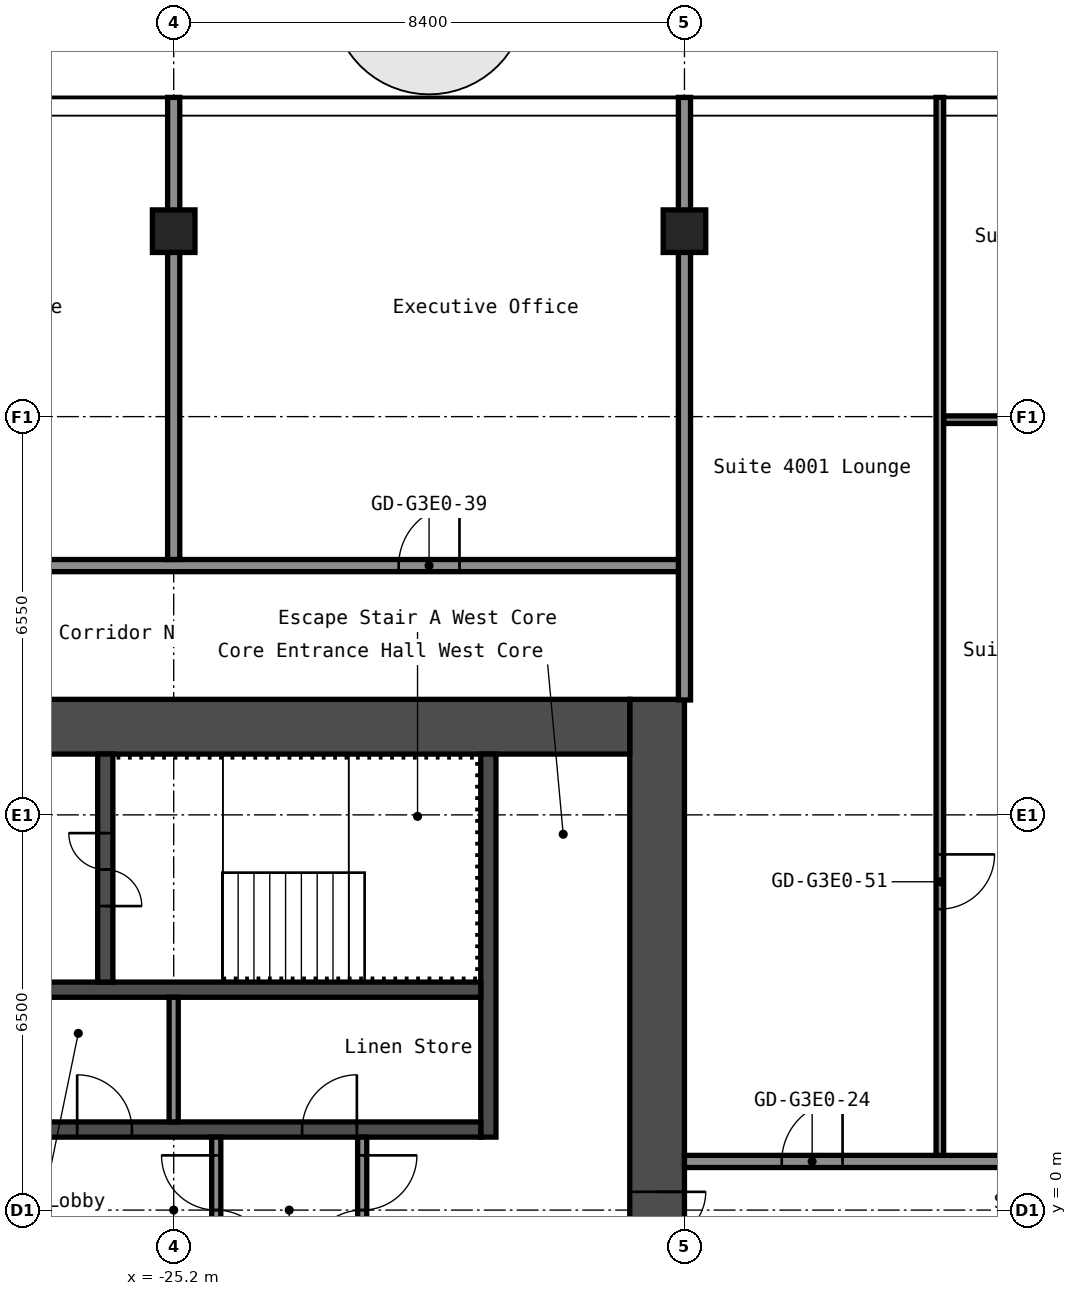
"""IFC4 building model, lengths in metres.
Left out: names, types, materials, properties, quantities, classifications, styles, units other than length and angle.
Written with IfcOpenShell. Run it as: python <this file> out.ifc"""

import sys

from ifc_helpers import new_model, si_unit, direction, frame, frame_2d, origin, origin_2d, place, context, subcontext, project, spatial, rectangle, hollow_rectangle, extrude, element, fill, save


model = new_model("IFC4")
c1 = context("Model", 3, precision=1e-05, world=origin(), true_north=direction((0.0, 1.0)))
c2 = subcontext(c1, "Body", "Model", "MODEL_VIEW")
j1 = project(units=[si_unit("LENGTHUNIT", "METRE"), si_unit("PLANEANGLEUNIT", "RADIAN")], contexts=[c1])
p1 = place(None, origin())
s1 = spatial("IfcSite", under=j1, at=p1, CompositionType="ELEMENT")
p2 = place(p1, origin())
s2 = spatial("IfcBuilding", under=s1, at=p2, CompositionType="ELEMENT")
p3 = place(p2, frame((0.0, 0.0, 143.8)))
s3 = spatial("IfcBuildingStorey", under=s2, at=p3, CompositionType="ELEMENT", Elevation=143.8)
for number, where, z_axis, x_axis in (
    (1, (-25.2, 16.1, 0.0), (0.0, 0.0, 1.0), (1.0, 0.0, 0.0)),
    (2, (-16.8, 16.1, 0.0), (0.0, 0.0, 1.0), (1.0, 0.0, 0.0)),
):
    element("IfcColumn", number, at=place(p3, frame(where, z_axis=z_axis, x_axis=x_axis)), inside=s3, PredefinedType="COLUMN", context=c2, shape_type="SweptSolid", body=[
        extrude(hollow_rectangle(XDim=0.7, YDim=0.7, WallThickness=0.028, at=origin_2d()), origin(), (0.0, 0.0, 1.0), 2.75),
    ])
p4 = place(p3, frame((-17.25, -8.4, 0.0), z_axis=(0.0, 0.0, 1.0), x_axis=(0.0, 1.0, 0.0)))
e3 = element("IfcWall", 3, at=p4, inside=s3, PredefinedType="SHEAR", context=c2, shape_type="SweptSolid", body=[
    extrude(rectangle(XDim=16.8, YDim=0.9, at=frame_2d((8.4, 0.0))), origin(), (0.0, 0.0, 1.0), 2.75),
])
p5 = place(p4, frame((7.1, 0.0, 0.0)))
e4 = element("IfcOpeningElement", 4, at=p5, cuts=e3, PredefinedType="OPENING", context=c2, shape_type="SweptSolid", body=[
    extrude(rectangle(XDim=1.6, YDim=2.1, at=frame_2d((0.8, 1.05))), frame((0.0, 0.46, 0.0), z_axis=(0.0, -1.0, 0.0), x_axis=(1.0, 0.0, 0.0)), (0.0, 0.0, 1.0), 0.92),
])
p6 = place(p3, frame((-32.7, 7.95, 0.0), z_axis=(0.0, 0.0, 1.0), x_axis=(1.0, 0.0, 0.0)))
e5 = element("IfcWall", 5, at=p6, inside=s3, PredefinedType="SHEAR", context=c2, shape_type="SweptSolid", body=[
    extrude(rectangle(XDim=15.0, YDim=0.9, at=frame_2d((7.5, 0.0))), origin(), (0.0, 0.0, 1.0), 2.75),
])
p7 = place(p6, frame((3.4, 0.0, 0.0)))
e6 = element("IfcOpeningElement", 6, at=p7, cuts=e5, PredefinedType="OPENING", context=c2, shape_type="SweptSolid", body=[
    extrude(rectangle(XDim=1.2, YDim=2.1, at=frame_2d((0.6, 1.05))), frame((0.0, 0.46, 0.0), z_axis=(0.0, -1.0, 0.0), x_axis=(1.0, 0.0, 0.0)), (0.0, 0.0, 1.0), 0.92),
])
p8 = place(p6, frame((0.75, 0.0, 0.0)))
e7 = element("IfcOpeningElement", 7, at=p8, cuts=e5, PredefinedType="OPENING", context=c2, shape_type="SweptSolid", body=[
    extrude(rectangle(XDim=0.9, YDim=2.1, at=frame_2d((0.45, 1.05))), frame((0.0, 0.46, 0.0), z_axis=(0.0, -1.0, 0.0), x_axis=(1.0, 0.0, 0.0)), (0.0, 0.0, 1.0), 0.92),
])
p9 = place(p3, frame((-20.025, 1.2, 0.0), z_axis=(0.0, 0.0, 1.0), x_axis=(0.0, 1.0, 0.0)))
e8 = element("IfcWall", 8, at=p9, inside=s3, PredefinedType="SHEAR", context=c2, shape_type="SweptSolid", body=[
    extrude(rectangle(XDim=6.3, YDim=0.25, at=frame_2d((3.15, 0.0))), origin(), (0.0, 0.0, 1.0), 2.75),
])
p10 = place(p3, frame((-27.65, 1.325, 0.0), z_axis=(0.0, 0.0, 1.0), x_axis=(1.0, 0.0, 0.0)))
e9 = element("IfcWall", 9, at=p10, inside=s3, PredefinedType="SHEAR", context=c2, shape_type="SweptSolid", body=[
    extrude(rectangle(XDim=7.5, YDim=0.25, at=frame_2d((3.75, 0.0))), origin(), (0.0, 0.0, 1.0), 2.75),
])
p11 = place(p10, frame((4.562, 0.0, 0.0)))
e10 = element("IfcOpeningElement", 10, at=p11, cuts=e9, PredefinedType="OPENING", context=c2, shape_type="SweptSolid", body=[
    extrude(rectangle(XDim=0.9, YDim=2.1, at=frame_2d((0.45, 1.05))), frame((0.0, 0.135, 0.0), z_axis=(0.0, -1.0, 0.0), x_axis=(1.0, 0.0, 0.0)), (0.0, 0.0, 1.0), 0.27),
])
p12 = place(p10, frame((0.863, 0.0, 0.0)))
e11 = element("IfcOpeningElement", 11, at=p12, cuts=e9, PredefinedType="OPENING", context=c2, shape_type="SweptSolid", body=[
    extrude(rectangle(XDim=0.9, YDim=2.1, at=frame_2d((0.45, 1.05))), frame((0.0, 0.135, 0.0), z_axis=(0.0, -1.0, 0.0), x_axis=(1.0, 0.0, 0.0)), (0.0, 0.0, 1.0), 0.27),
])
p13 = place(p3, frame((-27.65, 3.625, 0.0), z_axis=(0.0, 0.0, 1.0), x_axis=(1.0, 0.0, 0.0)))
e12 = element("IfcWall", 12, at=p13, inside=s3, PredefinedType="SHEAR", context=c2, shape_type="SweptSolid", body=[
    extrude(rectangle(XDim=7.5, YDim=0.25, at=frame_2d((3.75, 0.0))), origin(), (0.0, 0.0, 1.0), 2.75),
])
p14 = place(p3, frame((-26.325, 3.75, 0.0), z_axis=(0.0, 0.0, 1.0), x_axis=(0.0, 1.0, 0.0)))
e13 = element("IfcWall", 13, at=p14, inside=s3, PredefinedType="SHEAR", context=c2, shape_type="SweptSolid", body=[
    extrude(rectangle(XDim=3.75, YDim=0.25, at=frame_2d((1.875, 0.0))), origin(), (0.0, 0.0, 1.0), 2.75),
])
p15 = place(p14, frame((1.25, 0.0, 0.0)))
e14 = element("IfcOpeningElement", 14, at=p15, cuts=e13, PredefinedType="OPENING", context=c2, shape_type="SweptSolid", body=[
    extrude(rectangle(XDim=1.2, YDim=2.1, at=frame_2d((0.6, 1.05))), frame((0.0, 0.135, 0.0), z_axis=(0.0, -1.0, 0.0), x_axis=(1.0, 0.0, 0.0)), (0.0, 0.0, 1.0), 0.27),
])
p16 = place(p3, frame((-22.1, -1.2, 0.0), z_axis=(0.0, 0.0, 1.0), x_axis=(0.0, 1.0, 0.0)))
e15 = element("IfcWall", 15, at=p16, inside=s3, PredefinedType="PARTITIONING", context=c2, shape_type="SweptSolid", body=[
    extrude(rectangle(XDim=2.4, YDim=0.15, at=frame_2d((1.2, 0.0))), origin(), (0.0, 0.0, 1.0), 2.75),
])
p17 = place(p16, frame((0.3, 0.0, 0.0)))
e16 = element("IfcOpeningElement", 16, at=p17, cuts=e15, PredefinedType="OPENING", context=c2, shape_type="SweptSolid", body=[
    extrude(rectangle(XDim=1.8, YDim=2.1, at=frame_2d((0.9, 1.05))), frame((0.0, 0.085, 0.0), z_axis=(0.0, -1.0, 0.0), x_axis=(1.0, 0.0, 0.0)), (0.0, 0.0, 1.0), 0.17),
])
p18 = place(p3, frame((-24.5, -1.2, 0.0), z_axis=(0.0, 0.0, 1.0), x_axis=(0.0, 1.0, 0.0)))
e17 = element("IfcWall", 17, at=p18, inside=s3, PredefinedType="PARTITIONING", context=c2, shape_type="SweptSolid", body=[
    extrude(rectangle(XDim=2.4, YDim=0.15, at=frame_2d((1.2, 0.0))), origin(), (0.0, 0.0, 1.0), 2.75),
])
p19 = place(p18, frame((0.3, 0.0, 0.0)))
e18 = element("IfcOpeningElement", 18, at=p19, cuts=e17, PredefinedType="OPENING", context=c2, shape_type="SweptSolid", body=[
    extrude(rectangle(XDim=1.8, YDim=2.1, at=frame_2d((0.9, 1.05))), frame((0.0, 0.085, 0.0), z_axis=(0.0, -1.0, 0.0), x_axis=(1.0, 0.0, 0.0)), (0.0, 0.0, 1.0), 0.17),
])
p20 = place(p3, frame((-25.2, 1.45, 0.0), z_axis=(0.0, 0.0, 1.0), x_axis=(0.0, 1.0, 0.0)))
e19 = element("IfcWall", 19, at=p20, inside=s3, PredefinedType="PARTITIONING", context=c2, shape_type="SweptSolid", body=[
    extrude(rectangle(XDim=2.05, YDim=0.15, at=frame_2d((1.025, 0.0))), origin(), (0.0, 0.0, 1.0), 2.75),
])
p21 = place(p3, frame((-16.8, 0.8, 0.0), z_axis=(0.0, 0.0, 1.0), x_axis=(1.0, 0.0, 0.0)))
e20 = element("IfcWall", 20, at=p21, inside=s3, PredefinedType="PARTITIONING", context=c2, shape_type="SweptSolid", body=[
    extrude(rectangle(XDim=33.6, YDim=0.2, at=frame_2d((16.8, 0.0))), origin(), (0.0, 0.0, 1.0), 2.75),
])
p22 = place(p21, frame((1.6, 0.0, 0.0)))
e21 = element("IfcOpeningElement", 21, at=p22, cuts=e20, PredefinedType="OPENING", context=c2, shape_type="SweptSolid", body=[
    extrude(rectangle(XDim=1.0, YDim=2.1, at=frame_2d((0.5, 1.05))), frame((0.0, 0.11, 0.0), z_axis=(0.0, -1.0, 0.0), x_axis=(1.0, 0.0, 0.0)), (0.0, 0.0, 1.0), 0.22),
])
p23 = place(p21, frame((14.2, 0.0, 0.0)))
e22 = element("IfcOpeningElement", 22, at=p23, cuts=e20, PredefinedType="OPENING", context=c2, shape_type="SweptSolid", body=[
    extrude(rectangle(XDim=1.0, YDim=2.1, at=frame_2d((0.5, 1.05))), frame((0.0, 0.11, 0.0), z_axis=(0.0, -1.0, 0.0), x_axis=(1.0, 0.0, 0.0)), (0.0, 0.0, 1.0), 0.22),
])
p24 = place(p21, frame((22.6, 0.0, 0.0)))
e23 = element("IfcOpeningElement", 23, at=p24, cuts=e20, PredefinedType="OPENING", context=c2, shape_type="SweptSolid", body=[
    extrude(rectangle(XDim=1.0, YDim=2.1, at=frame_2d((0.5, 1.05))), frame((0.0, 0.11, 0.0), z_axis=(0.0, -1.0, 0.0), x_axis=(1.0, 0.0, 0.0)), (0.0, 0.0, 1.0), 0.22),
])
p25 = place(p21, frame((26.8, 0.0, 0.0)))
e24 = element("IfcOpeningElement", 24, at=p25, cuts=e20, PredefinedType="OPENING", context=c2, shape_type="SweptSolid", body=[
    extrude(rectangle(XDim=1.0, YDim=2.1, at=frame_2d((0.5, 1.05))), frame((0.0, 0.11, 0.0), z_axis=(0.0, -1.0, 0.0), x_axis=(1.0, 0.0, 0.0)), (0.0, 0.0, 1.0), 0.22),
])
p26 = place(p3, frame((-42.7, 10.6, 0.0), z_axis=(0.0, 0.0, 1.0), x_axis=(1.0, 0.0, 0.0)))
e25 = element("IfcWall", 25, at=p26, inside=s3, PredefinedType="PARTITIONING", context=c2, shape_type="SweptSolid", body=[
    extrude(rectangle(XDim=25.9, YDim=0.2, at=frame_2d((12.95, 0.0))), origin(), (0.0, 0.0, 1.0), 2.75),
])
p27 = place(p26, frame((1.52, 0.0, 0.0)))
e26 = element("IfcOpeningElement", 26, at=p27, cuts=e25, PredefinedType="OPENING", context=c2, shape_type="SweptSolid", body=[
    extrude(rectangle(XDim=0.9, YDim=2.1, at=frame_2d((0.45, 1.05))), frame((0.0, 0.11, 0.0), z_axis=(0.0, -1.0, 0.0), x_axis=(1.0, 0.0, 0.0)), (0.0, 0.0, 1.0), 0.22),
])
p28 = place(p26, frame((5.92, 0.0, 0.0)))
e27 = element("IfcOpeningElement", 27, at=p28, cuts=e25, PredefinedType="OPENING", context=c2, shape_type="SweptSolid", body=[
    extrude(rectangle(XDim=0.9, YDim=2.1, at=frame_2d((0.45, 1.05))), frame((0.0, 0.11, 0.0), z_axis=(0.0, -1.0, 0.0), x_axis=(1.0, 0.0, 0.0)), (0.0, 0.0, 1.0), 0.22),
])
p29 = place(p26, frame((12.8, 0.0, 0.0)))
e28 = element("IfcOpeningElement", 28, at=p29, cuts=e25, PredefinedType="OPENING", context=c2, shape_type="SweptSolid", body=[
    extrude(rectangle(XDim=1.0, YDim=2.1, at=frame_2d((0.5, 1.05))), frame((0.0, 0.11, 0.0), z_axis=(0.0, -1.0, 0.0), x_axis=(1.0, 0.0, 0.0)), (0.0, 0.0, 1.0), 0.22),
])
p30 = place(p26, frame((21.2, 0.0, 0.0)))
e29 = element("IfcOpeningElement", 29, at=p30, cuts=e25, PredefinedType="OPENING", context=c2, shape_type="SweptSolid", body=[
    extrude(rectangle(XDim=1.0, YDim=2.1, at=frame_2d((0.5, 1.05))), frame((0.0, 0.11, 0.0), z_axis=(0.0, -1.0, 0.0), x_axis=(1.0, 0.0, 0.0)), (0.0, 0.0, 1.0), 0.22),
])
p31 = place(p3, frame((-12.538, 13.0, 0.0), z_axis=(0.0, 0.0, 1.0), x_axis=(1.0, 0.0, 0.0)))
e30 = element("IfcWall", 30, at=p31, inside=s3, PredefinedType="PARTITIONING", context=c2, shape_type="SweptSolid", body=[
    extrude(rectangle(XDim=8.275, YDim=0.125, at=frame_2d((4.138, 0.0))), origin(), (0.0, 0.0, 1.0), 2.75),
])
p32 = place(p31, frame((1.587, 0.0, 0.0)))
e31 = element("IfcOpeningElement", 31, at=p32, cuts=e30, PredefinedType="OPENING", context=c2, shape_type="SweptSolid", body=[
    extrude(rectangle(XDim=0.9, YDim=2.1, at=frame_2d((0.45, 1.05))), frame((0.0, 0.073, 0.0), z_axis=(0.0, -1.0, 0.0), x_axis=(1.0, 0.0, 0.0)), (0.0, 0.0, 1.0), 0.145),
])
p33 = place(p31, frame((5.788, 0.0, 0.0)))
e32 = element("IfcOpeningElement", 32, at=p33, cuts=e30, PredefinedType="OPENING", context=c2, shape_type="SweptSolid", body=[
    extrude(rectangle(XDim=0.9, YDim=2.1, at=frame_2d((0.45, 1.05))), frame((0.0, 0.073, 0.0), z_axis=(0.0, -1.0, 0.0), x_axis=(1.0, 0.0, 0.0)), (0.0, 0.0, 1.0), 0.145),
])
p34 = place(p3, frame((-25.2, 10.7, 0.0), z_axis=(0.0, 0.0, 1.0), x_axis=(0.0, 1.0, 0.0)))
e33 = element("IfcWall", 33, at=p34, inside=s3, PredefinedType="PARTITIONING", context=c2, shape_type="SweptSolid", body=[
    extrude(rectangle(XDim=7.6, YDim=0.2, at=frame_2d((3.8, 0.0))), origin(), (0.0, 0.0, 1.0), 2.75),
])
p35 = place(p3, frame((-16.8, 8.39, 0.0), z_axis=(0.0, 0.0, 1.0), x_axis=(0.0, 1.0, 0.0)))
e34 = element("IfcWall", 34, at=p35, inside=s3, PredefinedType="PARTITIONING", context=c2, shape_type="SweptSolid", body=[
    extrude(rectangle(XDim=9.91, YDim=0.2, at=frame_2d((4.955, 0.0))), origin(), (0.0, 0.0, 1.0), 2.75),
])
p36 = place(p3, frame((-12.6, 0.9, 0.0), z_axis=(0.0, 0.0, 1.0), x_axis=(0.0, 1.0, 0.0)))
e35 = element("IfcWall", 35, at=p36, inside=s3, PredefinedType="PARTITIONING", context=c2, shape_type="SweptSolid", body=[
    extrude(rectangle(XDim=17.4, YDim=0.125, at=frame_2d((8.7, 0.0))), origin(), (0.0, 0.0, 1.0), 2.75),
])
p37 = place(p36, frame((4.05, 0.0, 0.0)))
e36 = element("IfcOpeningElement", 36, at=p37, cuts=e35, PredefinedType="OPENING", context=c2, shape_type="SweptSolid", body=[
    extrude(rectangle(XDim=0.9, YDim=2.1, at=frame_2d((0.45, 1.05))), frame((0.0, 0.073, 0.0), z_axis=(0.0, -1.0, 0.0), x_axis=(1.0, 0.0, 0.0)), (0.0, 0.0, 1.0), 0.145),
])
p38 = place(p5, origin())
e37 = element("IfcDoor", 37, at=p38, inside=s3, OperationType="DOUBLE_DOOR_SINGLE_SWING", PredefinedType="DOOR", context=c2, shape_type="SweptSolid", body=[
    extrude(rectangle(XDim=1.6, YDim=2.1, at=frame_2d((0.8, 1.05))), frame((0.0, 0.025, 0.0), z_axis=(0.0, -1.0, 0.0), x_axis=(1.0, 0.0, 0.0)), (0.0, 0.0, 1.0), 0.05),
])
fill(e4, e37)
p39 = place(p15, origin())
e38 = element("IfcDoor", 38, at=p39, inside=s3, OperationType="DOUBLE_DOOR_SINGLE_SWING", PredefinedType="DOOR", context=c2, shape_type="SweptSolid", body=[
    extrude(rectangle(XDim=1.2, YDim=2.1, at=frame_2d((0.6, 1.05))), frame((0.0, 0.025, 0.0), z_axis=(0.0, -1.0, 0.0), x_axis=(1.0, 0.0, 0.0)), (0.0, 0.0, 1.0), 0.05),
])
fill(e14, e38)
p40 = place(p17, origin())
e39 = element("IfcDoor", 39, at=p40, inside=s3, OperationType="DOUBLE_DOOR_SINGLE_SWING", PredefinedType="DOOR", context=c2, shape_type="SweptSolid", body=[
    extrude(rectangle(XDim=1.8, YDim=2.1, at=frame_2d((0.9, 1.05))), frame((0.0, 0.025, 0.0), z_axis=(0.0, -1.0, 0.0), x_axis=(1.0, 0.0, 0.0)), (0.0, 0.0, 1.0), 0.05),
])
fill(e16, e39)
p41 = place(p19, origin())
e40 = element("IfcDoor", 40, at=p41, inside=s3, OperationType="DOUBLE_DOOR_SINGLE_SWING", PredefinedType="DOOR", context=c2, shape_type="SweptSolid", body=[
    extrude(rectangle(XDim=1.8, YDim=2.1, at=frame_2d((0.9, 1.05))), frame((0.0, 0.025, 0.0), z_axis=(0.0, -1.0, 0.0), x_axis=(1.0, 0.0, 0.0)), (0.0, 0.0, 1.0), 0.05),
])
fill(e18, e40)
p42 = place(p11, origin())
e41 = element("IfcDoor", 41, at=p42, inside=s3, OperationType="SINGLE_SWING_LEFT", PredefinedType="DOOR", context=c2, shape_type="SweptSolid", body=[
    extrude(rectangle(XDim=0.9, YDim=2.1, at=frame_2d((0.45, 1.05))), frame((0.0, 0.025, 0.0), z_axis=(0.0, -1.0, 0.0), x_axis=(1.0, 0.0, 0.0)), (0.0, 0.0, 1.0), 0.05),
])
fill(e10, e41)
p43 = place(p12, origin())
e42 = element("IfcDoor", 42, at=p43, inside=s3, OperationType="SINGLE_SWING_RIGHT", PredefinedType="DOOR", context=c2, shape_type="SweptSolid", body=[
    extrude(rectangle(XDim=0.9, YDim=2.1, at=frame_2d((0.45, 1.05))), frame((0.0, 0.025, 0.0), z_axis=(0.0, -1.0, 0.0), x_axis=(1.0, 0.0, 0.0)), (0.0, 0.0, 1.0), 0.05),
])
fill(e11, e42)
p44 = place(p22, origin())
e43 = element("IfcDoor", 43, at=p44, inside=s3, OperationType="SINGLE_SWING_LEFT", PredefinedType="DOOR", context=c2, shape_type="SweptSolid", body=[
    extrude(rectangle(XDim=1.0, YDim=2.1, at=frame_2d((0.5, 1.05))), frame((0.0, 0.025, 0.0), z_axis=(0.0, -1.0, 0.0), x_axis=(1.0, 0.0, 0.0)), (0.0, 0.0, 1.0), 0.05),
])
fill(e21, e43)
p45 = place(p30, origin())
e44 = element("IfcDoor", 44, at=p45, inside=s3, OperationType="SINGLE_SWING_LEFT", PredefinedType="DOOR", context=c2, shape_type="SweptSolid", body=[
    extrude(rectangle(XDim=1.0, YDim=2.1, at=frame_2d((0.5, 1.05))), frame((0.0, 0.025, 0.0), z_axis=(0.0, -1.0, 0.0), x_axis=(1.0, 0.0, 0.0)), (0.0, 0.0, 1.0), 0.05),
])
fill(e29, e44)
p46 = place(p37, origin())
e45 = element("IfcDoor", 45, at=p46, inside=s3, OperationType="SINGLE_SWING_RIGHT", PredefinedType="DOOR", context=c2, shape_type="SweptSolid", body=[
    extrude(rectangle(XDim=0.9, YDim=2.1, at=frame_2d((0.45, 1.05))), frame((0.0, 0.025, 0.0), z_axis=(0.0, -1.0, 0.0), x_axis=(1.0, 0.0, 0.0)), (0.0, 0.0, 1.0), 0.05),
])
fill(e36, e45)
save(model, sys.argv[1])
